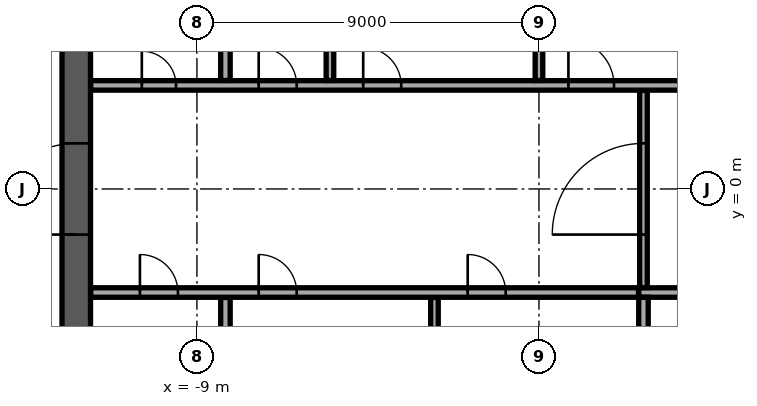
"""IFC4 building model, lengths in metres.
Left out: names, types, materials, properties, quantities, classifications, styles, units other than length and angle.
Written with IfcOpenShell. Run it as: python <this file> out.ifc"""

import sys

from ifc_helpers import new_model, si_unit, direction, frame, frame_2d, origin, place, context, subcontext, project, spatial, rectangle, extrude, element, fill, save


model = new_model("IFC4")
c1 = context("Model", 3, precision=1e-05, world=origin(), true_north=direction((0.0, 1.0)))
c2 = subcontext(c1, "Body", "Model", "MODEL_VIEW")
j1 = project(units=[si_unit("LENGTHUNIT", "METRE"), si_unit("PLANEANGLEUNIT", "RADIAN")], contexts=[c1])
p1 = place(None, origin())
s1 = spatial("IfcSite", under=j1, at=p1, CompositionType="ELEMENT")
p2 = place(p1, origin())
s2 = spatial("IfcBuilding", under=s1, at=p2, CompositionType="ELEMENT")
p3 = place(p2, frame((0.0, 0.0, 282.9)))
s3 = spatial("IfcBuildingStorey", under=s2, at=p3, CompositionType="ELEMENT", Elevation=282.9)
p4 = place(p3, frame((-12.175, -11.8, 0.0), z_axis=(0.0, 0.0, 1.0), x_axis=(0.0, 1.0, 0.0)))
e1 = element("IfcWall", 1, at=p4, inside=s3, PredefinedType="SHEAR", context=c2, shape_type="SweptSolid", body=[
    extrude(rectangle(XDim=23.6, YDim=0.75, at=frame_2d((11.8, 0.0))), origin(), (0.0, 0.0, 1.0), 3.64),
])
p5 = place(p4, frame((10.6, 0.0, 0.0)))
e2 = element("IfcOpeningElement", 2, at=p5, cuts=e1, PredefinedType="OPENING", context=c2, shape_type="SweptSolid", body=[
    extrude(rectangle(XDim=2.4, YDim=2.4, at=frame_2d((1.2, 1.2))), frame((0.0, 0.385, 0.0), z_axis=(0.0, -1.0, 0.0), x_axis=(1.0, 0.0, 0.0)), (0.0, 0.0, 1.0), 0.77),
])
p6 = place(p3, frame((2.625, -2.725, 0.0), z_axis=(0.0, 0.0, 1.0), x_axis=(1.0, 0.0, 0.0)))
e3 = element("IfcWall", 3, at=p6, inside=s3, PredefinedType="SOLIDWALL", context=c2, shape_type="SweptSolid", body=[
    extrude(rectangle(XDim=3.0, YDim=0.25, at=frame_2d((1.5, 0.0))), origin(), (0.0, 0.0, 1.0), 3.64),
])
p7 = place(p3, frame((2.75, -5.55, 0.0), z_axis=(0.0, 0.0, 1.0), x_axis=(0.0, 1.0, 0.0)))
e4 = element("IfcWall", 4, at=p7, inside=s3, PredefinedType="SOLIDWALL", context=c2, shape_type="SweptSolid", body=[
    extrude(rectangle(XDim=2.7, YDim=0.25, at=frame_2d((1.35, 0.0))), origin(), (0.0, 0.0, 1.0), 3.64),
])
p8 = place(p3, frame((-8.25, -5.545, 0.0), z_axis=(0.0, 0.0, 1.0), x_axis=(0.0, 1.0, 0.0)))
e5 = element("IfcWall", 5, at=p8, inside=s3, PredefinedType="PARTITIONING", context=c2, shape_type="SweptSolid", body=[
    extrude(rectangle(XDim=2.69, YDim=0.25, at=frame_2d((1.345, 0.0))), origin(), (0.0, 0.0, 1.0), 3.64),
])
p9 = place(p3, frame((-2.75, -5.545, 0.0), z_axis=(0.0, 0.0, 1.0), x_axis=(0.0, 1.0, 0.0)))
e6 = element("IfcWall", 6, at=p9, inside=s3, PredefinedType="PARTITIONING", context=c2, shape_type="SweptSolid", body=[
    extrude(rectangle(XDim=2.69, YDim=0.2, at=frame_2d((1.345, 0.0))), origin(), (0.0, 0.0, 1.0), 3.64),
])
p10 = place(p3, frame((-11.795, -2.725, 0.0), z_axis=(0.0, 0.0, 1.0), x_axis=(1.0, 0.0, 0.0)))
e7 = element("IfcWall", 7, at=p10, inside=s3, PredefinedType="PARTITIONING", context=c2, shape_type="SweptSolid", body=[
    extrude(rectangle(XDim=14.415, YDim=0.25, at=frame_2d((7.208, 0.0))), origin(), (0.0, 0.0, 1.0), 3.64),
])
p11 = place(p10, frame((1.295, 0.0, 0.0)))
e8 = element("IfcOpeningElement", 8, at=p11, cuts=e7, PredefinedType="OPENING", context=c2, shape_type="SweptSolid", body=[
    extrude(rectangle(XDim=1.0, YDim=2.1, at=frame_2d((0.5, 1.05))), frame((0.0, 0.135, 0.0), z_axis=(0.0, -1.0, 0.0), x_axis=(1.0, 0.0, 0.0)), (0.0, 0.0, 1.0), 0.27),
])
p12 = place(p10, frame((4.42, 0.0, 0.0)))
e9 = element("IfcOpeningElement", 9, at=p12, cuts=e7, PredefinedType="OPENING", context=c2, shape_type="SweptSolid", body=[
    extrude(rectangle(XDim=1.0, YDim=2.1, at=frame_2d((0.5, 1.05))), frame((0.0, 0.135, 0.0), z_axis=(0.0, -1.0, 0.0), x_axis=(1.0, 0.0, 0.0)), (0.0, 0.0, 1.0), 0.27),
])
p13 = place(p10, frame((9.92, 0.0, 0.0)))
e10 = element("IfcOpeningElement", 10, at=p13, cuts=e7, PredefinedType="OPENING", context=c2, shape_type="SweptSolid", body=[
    extrude(rectangle(XDim=1.0, YDim=2.1, at=frame_2d((0.5, 1.05))), frame((0.0, 0.135, 0.0), z_axis=(0.0, -1.0, 0.0), x_axis=(1.0, 0.0, 0.0)), (0.0, 0.0, 1.0), 0.27),
])
p14 = place(p3, frame((2.75, -2.595, 0.0), z_axis=(0.0, 0.0, 1.0), x_axis=(0.0, 1.0, 0.0)))
e11 = element("IfcWall", 11, at=p14, inside=s3, PredefinedType="PARTITIONING", context=c2, shape_type="SweptSolid", body=[
    extrude(rectangle(XDim=5.19, YDim=0.2, at=frame_2d((2.595, 0.0))), origin(), (0.0, 0.0, 1.0), 3.64),
])
p15 = place(p14, frame((1.395, 0.0, 0.0)))
e12 = element("IfcOpeningElement", 12, at=p15, cuts=e11, PredefinedType="OPENING", context=c2, shape_type="SweptSolid", body=[
    extrude(rectangle(XDim=2.4, YDim=2.4, at=frame_2d((1.2, 1.2))), frame((0.0, 0.11, 0.0), z_axis=(0.0, -1.0, 0.0), x_axis=(1.0, 0.0, 0.0)), (0.0, 0.0, 1.0), 0.22),
])
p16 = place(p3, frame((-11.795, 2.725, 0.0), z_axis=(0.0, 0.0, 1.0), x_axis=(1.0, 0.0, 0.0)))
e13 = element("IfcWall", 13, at=p16, inside=s3, PredefinedType="PARTITIONING", context=c2, shape_type="SweptSolid", body=[
    extrude(rectangle(XDim=23.59, YDim=0.25, at=frame_2d((11.795, 0.0))), origin(), (0.0, 0.0, 1.0), 3.64),
])
p17 = place(p16, frame((21.345, 0.0, 0.0)))
e14 = element("IfcOpeningElement", 14, at=p17, cuts=e13, PredefinedType="OPENING", context=c2, shape_type="SweptSolid", body=[
    extrude(rectangle(XDim=0.9, YDim=2.1, at=frame_2d((0.45, 1.05))), frame((0.0, 0.135, 0.0), z_axis=(0.0, -1.0, 0.0), x_axis=(1.0, 0.0, 0.0)), (0.0, 0.0, 1.0), 0.27),
])
p18 = place(p16, frame((1.345, 0.0, 0.0)))
e15 = element("IfcOpeningElement", 15, at=p18, cuts=e13, PredefinedType="OPENING", context=c2, shape_type="SweptSolid", body=[
    extrude(rectangle(XDim=0.9, YDim=2.1, at=frame_2d((0.45, 1.05))), frame((0.0, 0.135, 0.0), z_axis=(0.0, -1.0, 0.0), x_axis=(1.0, 0.0, 0.0)), (0.0, 0.0, 1.0), 0.27),
])
p19 = place(p16, frame((4.42, 0.0, 0.0)))
e16 = element("IfcOpeningElement", 16, at=p19, cuts=e13, PredefinedType="OPENING", context=c2, shape_type="SweptSolid", body=[
    extrude(rectangle(XDim=1.0, YDim=2.1, at=frame_2d((0.5, 1.05))), frame((0.0, 0.135, 0.0), z_axis=(0.0, -1.0, 0.0), x_axis=(1.0, 0.0, 0.0)), (0.0, 0.0, 1.0), 0.27),
])
p20 = place(p16, frame((7.17, 0.0, 0.0)))
e17 = element("IfcOpeningElement", 17, at=p20, cuts=e13, PredefinedType="OPENING", context=c2, shape_type="SweptSolid", body=[
    extrude(rectangle(XDim=1.0, YDim=2.1, at=frame_2d((0.5, 1.05))), frame((0.0, 0.135, 0.0), z_axis=(0.0, -1.0, 0.0), x_axis=(1.0, 0.0, 0.0)), (0.0, 0.0, 1.0), 0.27),
])
p21 = place(p16, frame((12.57, 0.0, 0.0)))
e18 = element("IfcOpeningElement", 18, at=p21, cuts=e13, PredefinedType="OPENING", context=c2, shape_type="SweptSolid", body=[
    extrude(rectangle(XDim=1.2, YDim=2.1, at=frame_2d((0.6, 1.05))), frame((0.0, 0.135, 0.0), z_axis=(0.0, -1.0, 0.0), x_axis=(1.0, 0.0, 0.0)), (0.0, 0.0, 1.0), 0.27),
])
p22 = place(p3, frame((-8.25, 2.855, 0.0), z_axis=(0.0, 0.0, 1.0), x_axis=(0.0, 1.0, 0.0)))
e19 = element("IfcWall", 19, at=p22, inside=s3, PredefinedType="PARTITIONING", context=c2, shape_type="SweptSolid", body=[
    extrude(rectangle(XDim=1.715, YDim=0.25, at=frame_2d((0.857, 0.0))), origin(), (0.0, 0.0, 1.0), 3.64),
])
for number, where, z_axis, x_axis in (
    (20, (-5.5, 2.855, 0.0), (0.0, 0.0, 1.0), (0.0, 1.0, 0.0)),
    (21, (0.0, 2.855, 0.0), (0.0, 0.0, 1.0), (0.0, 1.0, 0.0)),
):
    element("IfcWall", number, at=place(p3, frame(where, z_axis=z_axis, x_axis=x_axis)), inside=s3, PredefinedType="PARTITIONING", context=c2, shape_type="SweptSolid", body=[
        extrude(rectangle(XDim=2.69, YDim=0.2, at=frame_2d((1.345, 0.0))), origin(), (0.0, 0.0, 1.0), 3.64),
    ])
p23 = place(p3, frame((-10.292, 32.278, 0.0), z_axis=(0.0, 0.0, 1.0), x_axis=(-0.438370550468, -0.898794337144, 0.0)))
e22 = element("IfcWall", 22, at=p23, inside=s3, PredefinedType="STANDARD", context=c2, shape_type="SweptSolid", body=[
    extrude(rectangle(XDim=48.843, YDim=0.6, at=frame_2d((24.421, 0.0))), origin(), (0.0, 0.0, 1.0), 3.64),
])
p24 = place(p23, frame((1.22, 0.0, 0.9)))
e23 = element("IfcOpeningElement", 23, at=p24, cuts=e22, PredefinedType="OPENING", context=c2, shape_type="SweptSolid", body=[
    extrude(rectangle(XDim=2.0, YDim=2.1, at=frame_2d((1.0, 1.05))), frame((0.0, 0.31, 0.0), z_axis=(0.0, -1.0, 0.0), x_axis=(1.0, 0.0, 0.0)), (0.0, 0.0, 1.0), 0.62),
])
p25 = place(p23, frame((5.66, 0.0, 0.9)))
e24 = element("IfcOpeningElement", 24, at=p25, cuts=e22, PredefinedType="OPENING", context=c2, shape_type="SweptSolid", body=[
    extrude(rectangle(XDim=2.0, YDim=2.1, at=frame_2d((1.0, 1.05))), frame((0.0, 0.31, 0.0), z_axis=(0.0, -1.0, 0.0), x_axis=(1.0, 0.0, 0.0)), (0.0, 0.0, 1.0), 0.62),
])
p26 = place(p23, frame((10.101, 0.0, 0.9)))
e25 = element("IfcOpeningElement", 25, at=p26, cuts=e22, PredefinedType="OPENING", context=c2, shape_type="SweptSolid", body=[
    extrude(rectangle(XDim=2.0, YDim=2.1, at=frame_2d((1.0, 1.05))), frame((0.0, 0.31, 0.0), z_axis=(0.0, -1.0, 0.0), x_axis=(1.0, 0.0, 0.0)), (0.0, 0.0, 1.0), 0.62),
])
p27 = place(p23, frame((14.541, 0.0, 0.9)))
e26 = element("IfcOpeningElement", 26, at=p27, cuts=e22, PredefinedType="OPENING", context=c2, shape_type="SweptSolid", body=[
    extrude(rectangle(XDim=2.0, YDim=2.1, at=frame_2d((1.0, 1.05))), frame((0.0, 0.31, 0.0), z_axis=(0.0, -1.0, 0.0), x_axis=(1.0, 0.0, 0.0)), (0.0, 0.0, 1.0), 0.62),
])
p28 = place(p23, frame((18.981, 0.0, 0.9)))
e27 = element("IfcOpeningElement", 27, at=p28, cuts=e22, PredefinedType="OPENING", context=c2, shape_type="SweptSolid", body=[
    extrude(rectangle(XDim=2.0, YDim=2.1, at=frame_2d((1.0, 1.05))), frame((0.0, 0.31, 0.0), z_axis=(0.0, -1.0, 0.0), x_axis=(1.0, 0.0, 0.0)), (0.0, 0.0, 1.0), 0.62),
])
p29 = place(p23, frame((23.422, 0.0, 0.9)))
e28 = element("IfcOpeningElement", 28, at=p29, cuts=e22, PredefinedType="OPENING", context=c2, shape_type="SweptSolid", body=[
    extrude(rectangle(XDim=2.0, YDim=2.1, at=frame_2d((1.0, 1.05))), frame((0.0, 0.31, 0.0), z_axis=(0.0, -1.0, 0.0), x_axis=(1.0, 0.0, 0.0)), (0.0, 0.0, 1.0), 0.62),
])
p30 = place(p23, frame((27.862, 0.0, 0.9)))
e29 = element("IfcOpeningElement", 29, at=p30, cuts=e22, PredefinedType="OPENING", context=c2, shape_type="SweptSolid", body=[
    extrude(rectangle(XDim=2.0, YDim=2.1, at=frame_2d((1.0, 1.05))), frame((0.0, 0.31, 0.0), z_axis=(0.0, -1.0, 0.0), x_axis=(1.0, 0.0, 0.0)), (0.0, 0.0, 1.0), 0.62),
])
p31 = place(p23, frame((32.302, 0.0, 0.9)))
e30 = element("IfcOpeningElement", 30, at=p31, cuts=e22, PredefinedType="OPENING", context=c2, shape_type="SweptSolid", body=[
    extrude(rectangle(XDim=2.0, YDim=2.1, at=frame_2d((1.0, 1.05))), frame((0.0, 0.31, 0.0), z_axis=(0.0, -1.0, 0.0), x_axis=(1.0, 0.0, 0.0)), (0.0, 0.0, 1.0), 0.62),
])
p32 = place(p23, frame((36.742, 0.0, 0.9)))
e31 = element("IfcOpeningElement", 31, at=p32, cuts=e22, PredefinedType="OPENING", context=c2, shape_type="SweptSolid", body=[
    extrude(rectangle(XDim=2.0, YDim=2.1, at=frame_2d((1.0, 1.05))), frame((0.0, 0.31, 0.0), z_axis=(0.0, -1.0, 0.0), x_axis=(1.0, 0.0, 0.0)), (0.0, 0.0, 1.0), 0.62),
])
p33 = place(p23, frame((41.183, 0.0, 0.9)))
e32 = element("IfcOpeningElement", 32, at=p33, cuts=e22, PredefinedType="OPENING", context=c2, shape_type="SweptSolid", body=[
    extrude(rectangle(XDim=2.0, YDim=2.1, at=frame_2d((1.0, 1.05))), frame((0.0, 0.31, 0.0), z_axis=(0.0, -1.0, 0.0), x_axis=(1.0, 0.0, 0.0)), (0.0, 0.0, 1.0), 0.62),
])
p34 = place(p23, frame((45.623, 0.0, 0.9)))
e33 = element("IfcOpeningElement", 33, at=p34, cuts=e22, PredefinedType="OPENING", context=c2, shape_type="SweptSolid", body=[
    extrude(rectangle(XDim=2.0, YDim=2.1, at=frame_2d((1.0, 1.05))), frame((0.0, 0.31, 0.0), z_axis=(0.0, -1.0, 0.0), x_axis=(1.0, 0.0, 0.0)), (0.0, 0.0, 1.0), 0.62),
])
p35 = place(p5, origin())
e34 = element("IfcDoor", 34, at=p35, inside=s3, OperationType="SINGLE_SWING_LEFT", PredefinedType="DOOR", context=c2, shape_type="SweptSolid", body=[
    extrude(rectangle(XDim=2.4, YDim=2.4, at=frame_2d((1.2, 1.2))), frame((0.0, 0.025, 0.0), z_axis=(0.0, -1.0, 0.0), x_axis=(1.0, 0.0, 0.0)), (0.0, 0.0, 1.0), 0.05),
])
fill(e2, e34)
p36 = place(p11, origin())
e35 = element("IfcDoor", 35, at=p36, inside=s3, OperationType="SINGLE_SWING_RIGHT", PredefinedType="DOOR", context=c2, shape_type="SweptSolid", body=[
    extrude(rectangle(XDim=1.0, YDim=2.1, at=frame_2d((0.5, 1.05))), frame((0.0, 0.025, 0.0), z_axis=(0.0, -1.0, 0.0), x_axis=(1.0, 0.0, 0.0)), (0.0, 0.0, 1.0), 0.05),
])
fill(e8, e35)
p37 = place(p18, origin())
e36 = element("IfcDoor", 36, at=p37, inside=s3, OperationType="SINGLE_SWING_RIGHT", PredefinedType="DOOR", context=c2, shape_type="SweptSolid", body=[
    extrude(rectangle(XDim=0.9, YDim=2.1, at=frame_2d((0.45, 1.05))), frame((0.0, 0.025, 0.0), z_axis=(0.0, -1.0, 0.0), x_axis=(1.0, 0.0, 0.0)), (0.0, 0.0, 1.0), 0.05),
])
fill(e15, e36)
p38 = place(p19, origin())
e37 = element("IfcDoor", 37, at=p38, inside=s3, OperationType="SINGLE_SWING_RIGHT", PredefinedType="DOOR", context=c2, shape_type="SweptSolid", body=[
    extrude(rectangle(XDim=1.0, YDim=2.1, at=frame_2d((0.5, 1.05))), frame((0.0, 0.025, 0.0), z_axis=(0.0, -1.0, 0.0), x_axis=(1.0, 0.0, 0.0)), (0.0, 0.0, 1.0), 0.05),
])
fill(e16, e37)
p39 = place(p20, origin())
e38 = element("IfcDoor", 38, at=p39, inside=s3, OperationType="SINGLE_SWING_RIGHT", PredefinedType="DOOR", context=c2, shape_type="SweptSolid", body=[
    extrude(rectangle(XDim=1.0, YDim=2.1, at=frame_2d((0.5, 1.05))), frame((0.0, 0.025, 0.0), z_axis=(0.0, -1.0, 0.0), x_axis=(1.0, 0.0, 0.0)), (0.0, 0.0, 1.0), 0.05),
])
fill(e17, e38)
p40 = place(p21, origin())
e39 = element("IfcDoor", 39, at=p40, inside=s3, OperationType="SINGLE_SWING_LEFT", PredefinedType="DOOR", context=c2, shape_type="SweptSolid", body=[
    extrude(rectangle(XDim=1.2, YDim=2.1, at=frame_2d((0.6, 1.05))), frame((0.0, 0.025, 0.0), z_axis=(0.0, -1.0, 0.0), x_axis=(1.0, 0.0, 0.0)), (0.0, 0.0, 1.0), 0.05),
])
fill(e18, e39)
p41 = place(p12, origin())
e40 = element("IfcDoor", 40, at=p41, inside=s3, OperationType="SINGLE_SWING_RIGHT", PredefinedType="DOOR", context=c2, shape_type="SweptSolid", body=[
    extrude(rectangle(XDim=1.0, YDim=2.1, at=frame_2d((0.5, 1.05))), frame((0.0, 0.025, 0.0), z_axis=(0.0, -1.0, 0.0), x_axis=(1.0, 0.0, 0.0)), (0.0, 0.0, 1.0), 0.05),
])
fill(e9, e40)
p42 = place(p13, origin())
e41 = element("IfcDoor", 41, at=p42, inside=s3, OperationType="SINGLE_SWING_RIGHT", PredefinedType="DOOR", context=c2, shape_type="SweptSolid", body=[
    extrude(rectangle(XDim=1.0, YDim=2.1, at=frame_2d((0.5, 1.05))), frame((0.0, 0.025, 0.0), z_axis=(0.0, -1.0, 0.0), x_axis=(1.0, 0.0, 0.0)), (0.0, 0.0, 1.0), 0.05),
])
fill(e10, e41)
p43 = place(p15, origin())
e42 = element("IfcDoor", 42, at=p43, inside=s3, OperationType="DOUBLE_DOOR_DOUBLE_SWING", PredefinedType="DOOR", context=c2, shape_type="SweptSolid", body=[
    extrude(rectangle(XDim=2.4, YDim=2.4, at=frame_2d((1.2, 1.2))), frame((0.0, 0.025, 0.0), z_axis=(0.0, -1.0, 0.0), x_axis=(1.0, 0.0, 0.0)), (0.0, 0.0, 1.0), 0.05),
])
fill(e12, e42)
save(model, sys.argv[1])
